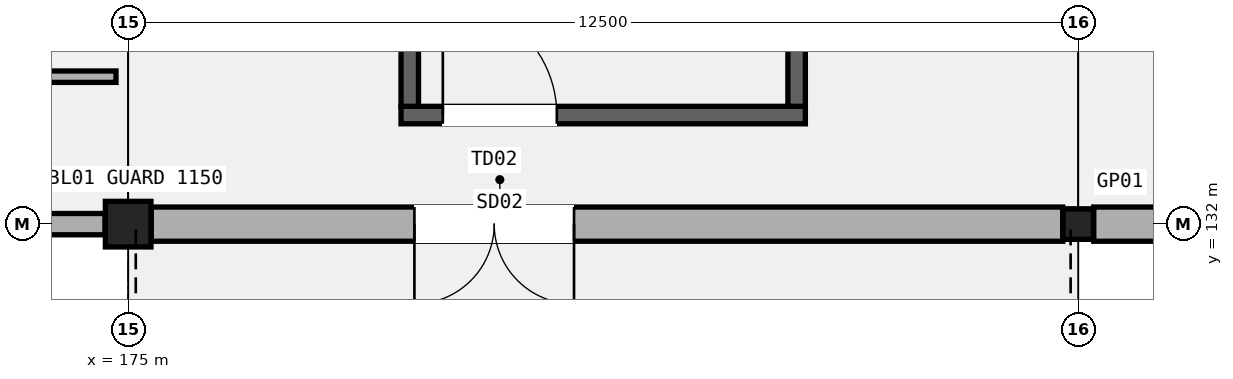
"""IFC4 building model, lengths in metres.
Left out: names, types, materials, properties, quantities, classifications, styles, units other than length and angle.
Written with IfcOpenShell. Run it as: python <this file> out.ifc"""

import sys

from ifc_helpers import new_model, si_unit, direction, frame, frame_2d, origin, origin_2d, place, context, subcontext, project, spatial, rectangle, hollow_rectangle, extrude, element, fill, save


model = new_model("IFC4")
c1 = context("Model", 3, precision=1e-05, world=origin(), true_north=direction((0.0, 1.0)))
c2 = subcontext(c1, "Body", "Model", "MODEL_VIEW")
j1 = project(units=[si_unit("LENGTHUNIT", "METRE"), si_unit("PLANEANGLEUNIT", "RADIAN")], contexts=[c1])
p1 = place(None, origin())
s1 = spatial("IfcSite", under=j1, at=p1, CompositionType="ELEMENT")
p2 = place(p1, origin())
s2 = spatial("IfcBuilding", under=s1, at=p2, CompositionType="ELEMENT")
p3 = place(p2, frame((0.0, 0.0, 20.4)))
s3 = spatial("IfcBuildingStorey", under=s2, at=p3, CompositionType="ELEMENT", Elevation=20.4)
p4 = place(p3, frame((175.0, 132.0, 0.0), z_axis=(0.0, 0.0, 1.0), x_axis=(1.0, 0.0, 0.0)))
e1 = element("IfcColumn", 1, at=p4, inside=s3, PredefinedType="COLUMN", context=c2, shape_type="SweptSolid", body=[
    extrude(rectangle(XDim=0.6, YDim=0.6, at=origin_2d()), origin(), (0.0, 0.0, 1.0), 5.4),
])
p5 = place(p3, frame((187.5, 132.0, 0.0), z_axis=(0.0, 0.0, 1.0), x_axis=(1.0, 0.0, 0.0)))
e2 = element("IfcColumn", 2, at=p5, inside=s3, PredefinedType="COLUMN", context=c2, shape_type="SweptSolid", body=[
    extrude(hollow_rectangle(XDim=0.4, YDim=0.4, WallThickness=0.016, InnerFilletRadius=0.016, OuterFilletRadius=0.032, at=origin_2d()), origin(), (0.0, 0.0, 1.0), 5.4),
])
p6 = place(p3, frame((162.854, 132.0, 0.0), z_axis=(0.0, 0.0, 1.0), x_axis=(1.0, 0.0, 0.0)))
e3 = element("IfcWall", 3, at=p6, inside=s3, PredefinedType="SOLIDWALL", context=c2, shape_type="SweptSolid", body=[
    extrude(rectangle(XDim=11.842, YDim=0.28, at=frame_2d((5.921, 0.0))), origin(), (0.0, 0.0, 1.0), 4.48),
])
p7 = place(p6, frame((1.5, 0.0, 0.95)))
e4 = element("IfcOpeningElement", 4, at=p7, cuts=e3, PredefinedType="OPENING", context=c2, shape_type="SweptSolid", body=[
    extrude(rectangle(XDim=1.8, YDim=2.55, at=frame_2d((0.9, 1.275))), frame((0.0, 0.15, 0.0), z_axis=(0.0, -1.0, 0.0), x_axis=(1.0, 0.0, 0.0)), (0.0, 0.0, 1.0), 0.3),
])
p8 = place(p3, frame((175.304, 132.0, 0.0), z_axis=(0.0, 0.0, 1.0), x_axis=(1.0, 0.0, 0.0)))
e5 = element("IfcWall", 5, at=p8, inside=s3, PredefinedType="SOLIDWALL", context=c2, shape_type="SweptSolid", body=[
    extrude(rectangle(XDim=11.992, YDim=0.45, at=frame_2d((5.996, 0.0))), origin(), (0.0, 0.0, 1.0), 4.58),
])
p9 = place(p8, frame((5.562, 0.0, 0.0), z_axis=(0.0, 0.0, 1.0), x_axis=(-1.0, 0.0, 0.0)))
e6 = element("IfcOpeningElement", 6, at=p9, cuts=e5, PredefinedType="OPENING", context=c2, shape_type="SweptSolid", body=[
    extrude(rectangle(XDim=2.1, YDim=2.35, at=frame_2d((1.05, 1.175))), frame((0.0, 0.235, 0.0), z_axis=(0.0, -1.0, 0.0), x_axis=(1.0, 0.0, 0.0)), (0.0, 0.0, 1.0), 0.47),
])
p10 = place(p3, frame((187.704, 132.0, 0.0), z_axis=(0.0, 0.0, 1.0), x_axis=(1.0, 0.0, 0.0)))
e7 = element("IfcWall", 7, at=p10, inside=s3, PredefinedType="SOLIDWALL", context=c2, shape_type="SweptSolid", body=[
    extrude(rectangle(XDim=12.117, YDim=0.45, at=frame_2d((6.059, 0.0))), origin(), (0.0, 0.0, 1.0), 4.592),
])
p11 = place(p10, frame((1.5, 0.0, 0.95)))
e8 = element("IfcOpeningElement", 8, at=p11, cuts=e7, PredefinedType="OPENING", context=c2, shape_type="SweptSolid", body=[
    extrude(rectangle(XDim=2.4, YDim=2.45, at=frame_2d((1.2, 1.225))), frame((0.0, 0.235, 0.0), z_axis=(0.0, -1.0, 0.0), x_axis=(1.0, 0.0, 0.0)), (0.0, 0.0, 1.0), 0.47),
])
p12 = place(p3, frame((178.59, 133.435, 0.0), z_axis=(0.0, 0.0, 1.0), x_axis=(1.0, 0.0, 0.0)))
e9 = element("IfcWall", 9, at=p12, inside=s3, PredefinedType="SHEAR", context=c2, shape_type="SweptSolid", body=[
    extrude(rectangle(XDim=5.32, YDim=0.23, at=frame_2d((2.66, 0.0))), origin(), (0.0, 0.0, 1.0), 5.18),
])
p13 = place(p12, frame((0.55, 0.0, 0.0)))
e10 = element("IfcOpeningElement", 10, at=p13, cuts=e9, PredefinedType="OPENING", context=c2, shape_type="SweptSolid", body=[
    extrude(rectangle(XDim=1.5, YDim=2.2, at=frame_2d((0.75, 1.1))), frame((0.0, 0.125, 0.0), z_axis=(0.0, -1.0, 0.0), x_axis=(1.0, 0.0, 0.0)), (0.0, 0.0, 1.0), 0.25),
])
for number, where, z_axis, x_axis in (
    (11, (178.705, 133.55, 0.0), (0.0, 0.0, 1.0), (0.0, 1.0, 0.0)),
    (12, (183.795, 133.55, 0.0), (0.0, 0.0, 1.0), (0.0, 1.0, 0.0)),
):
    element("IfcWall", number, at=place(p3, frame(where, z_axis=z_axis, x_axis=x_axis)), inside=s3, PredefinedType="SHEAR", context=c2, shape_type="SweptSolid", body=[
        extrude(rectangle(XDim=8.9, YDim=0.23, at=frame_2d((4.45, 0.0))), origin(), (0.0, 0.0, 1.0), 5.18),
    ])
p14 = place(p3, frame((162.66, 133.94, 0.0), z_axis=(0.0, 0.0, 1.0), x_axis=(1.0, 0.0, 0.0)))
e13 = element("IfcWall", 13, at=p14, inside=s3, PredefinedType="PARTITIONING", context=c2, shape_type="SweptSolid", body=[
    extrude(rectangle(XDim=12.18, YDim=0.15, at=frame_2d((6.09, 0.0))), origin(), (0.0, 0.0, 1.0), 4.52),
])
p15 = place(p14, frame((5.37, 0.0, 0.0)))
e14 = element("IfcOpeningElement", 14, at=p15, cuts=e13, PredefinedType="OPENING", context=c2, shape_type="SweptSolid", body=[
    extrude(rectangle(XDim=1.44, YDim=2.26, at=frame_2d((0.72, 1.13))), frame((0.0, 0.085, 0.0), z_axis=(0.0, -1.0, 0.0), x_axis=(1.0, 0.0, 0.0)), (0.0, 0.0, 1.0), 0.17),
])
p16 = place(p9, origin())
e15 = element("IfcDoor", 15, at=p16, inside=s3, OperationType="DOUBLE_DOOR_SINGLE_SWING", PredefinedType="DOOR", context=c2, shape_type="SweptSolid", body=[
    extrude(rectangle(XDim=2.1, YDim=2.35, at=frame_2d((1.05, 1.175))), frame((0.0, 0.025, 0.0), z_axis=(0.0, -1.0, 0.0), x_axis=(1.0, 0.0, 0.0)), (0.0, 0.0, 1.0), 0.05),
])
fill(e6, e15)
p17 = place(p13, origin())
e16 = element("IfcDoor", 16, at=p17, inside=s3, OperationType="SINGLE_SWING_LEFT", PredefinedType="DOOR", context=c2, shape_type="SweptSolid", body=[
    extrude(rectangle(XDim=1.5, YDim=2.2, at=frame_2d((0.75, 1.1))), frame((0.0, 0.025, 0.0), z_axis=(0.0, -1.0, 0.0), x_axis=(1.0, 0.0, 0.0)), (0.0, 0.0, 1.0), 0.05),
])
fill(e10, e16)
save(model, sys.argv[1])
